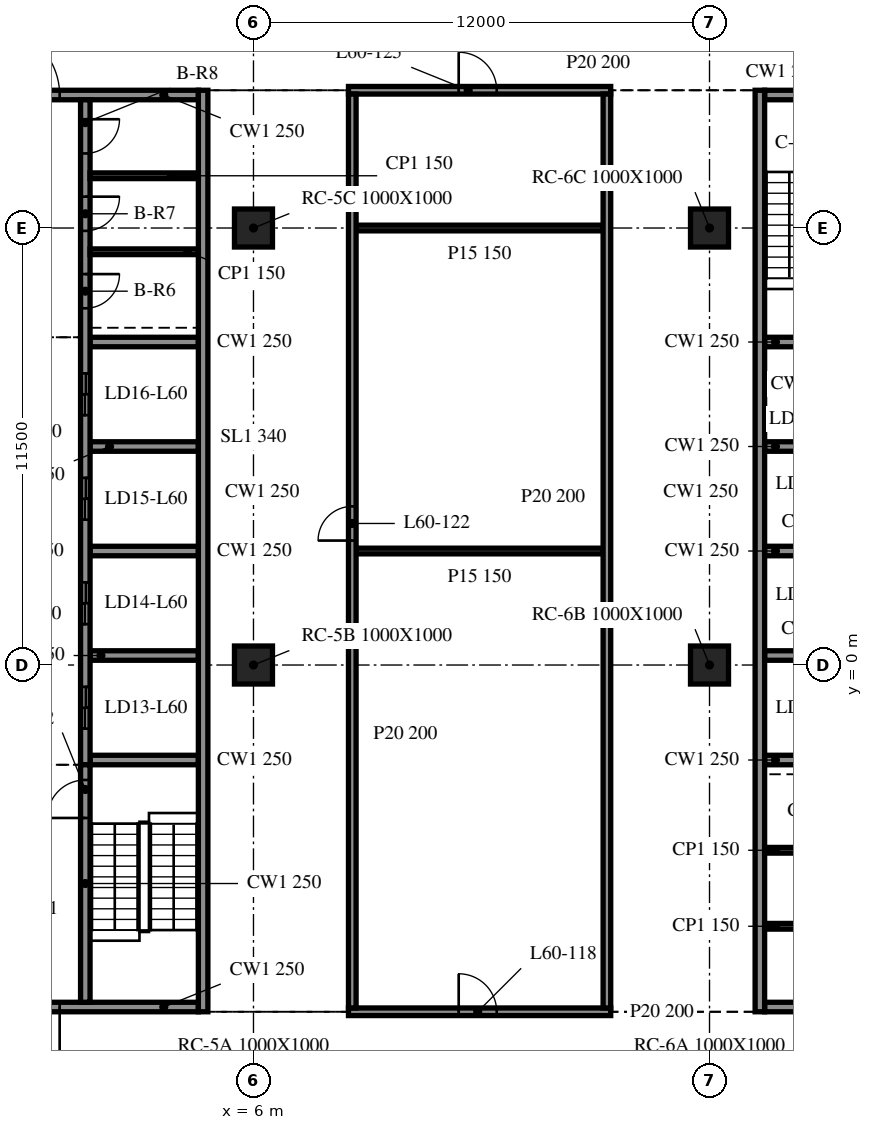
"""IFC4 building model, lengths in metres.
Left out: names, types, materials, properties, quantities, classifications, styles, units other than length and angle.
Written with IfcOpenShell. Run it as: python <this file> out.ifc"""

import sys

from ifc_helpers import new_model, si_unit, direction, frame, frame_2d, origin, origin_2d, place, context, subcontext, project, spatial, rectangle, extrude, element, fill, save


model = new_model("IFC4")
c1 = context("Model", 3, precision=1e-05, world=origin(), true_north=direction((0.0, 1.0)))
c2 = subcontext(c1, "Body", "Model", "MODEL_VIEW")
j1 = project(units=[si_unit("LENGTHUNIT", "METRE"), si_unit("PLANEANGLEUNIT", "RADIAN")], contexts=[c1])
p1 = place(None, origin())
s1 = spatial("IfcSite", under=j1, at=p1, CompositionType="ELEMENT")
p2 = place(p1, origin())
s2 = spatial("IfcBuilding", under=s1, at=p2, CompositionType="ELEMENT")
p3 = place(p2, frame((0.0, 0.0, 247.6)))
s3 = spatial("IfcBuildingStorey", under=s2, at=p3, CompositionType="ELEMENT", Elevation=247.6)
for number, where, z_axis, x_axis in (
    (1, (6.0, 0.0, -0.34), (0.0, 0.0, 1.0), (1.0, 0.0, 0.0)),
    (2, (6.0, 11.5, -0.34), (0.0, 0.0, 1.0), (1.0, 0.0, 0.0)),
    (3, (18.0, 0.0, -0.34), (0.0, 0.0, 1.0), (1.0, 0.0, 0.0)),
    (4, (18.0, 11.5, -0.34), (0.0, 0.0, 1.0), (1.0, 0.0, 0.0)),
):
    element("IfcColumn", number, at=place(p3, frame(where, z_axis=z_axis, x_axis=x_axis)), inside=s3, PredefinedType="COLUMN", context=c2, shape_type="SweptSolid", body=[
        extrude(rectangle(XDim=1.0, YDim=1.0, at=origin_2d()), origin(), (0.0, 0.0, 1.0), 3.8),
    ])
p4 = place(p3, frame((4.675, -9.125, 0.0), z_axis=(0.0, 0.0, 1.0), x_axis=(0.0, 1.0, 0.0)))
e5 = element("IfcWall", 5, at=p4, inside=s3, PredefinedType="SOLIDWALL", context=c2, shape_type="SweptSolid", body=[
    extrude(rectangle(XDim=24.25, YDim=0.25, at=frame_2d((12.125, 0.0))), origin(), (0.0, 0.0, 1.0), 3.46),
])
p5 = place(p3, frame((4.55, -9.0, 0.0), z_axis=(0.0, 0.0, 1.0), x_axis=(-1.0, 0.0, 0.0)))
e6 = element("IfcWall", 6, at=p5, inside=s3, PredefinedType="SOLIDWALL", context=c2, shape_type="SweptSolid", body=[
    extrude(rectangle(XDim=9.1, YDim=0.25, at=frame_2d((4.55, 0.0))), origin(), (0.0, 0.0, 1.0), 3.46),
])
p6 = place(p5, frame((3.65, 0.0, 0.0)))
e7 = element("IfcOpeningElement", 7, at=p6, cuts=e6, PredefinedType="OPENING", context=c2, shape_type="SweptSolid", body=[
    extrude(rectangle(XDim=1.8, YDim=2.1, at=frame_2d((0.9, 1.05))), frame((0.0, 0.135, 0.0), z_axis=(0.0, -1.0, 0.0), x_axis=(1.0, 0.0, 0.0)), (0.0, 0.0, 1.0), 0.27),
])
p7 = place(p3, frame((-4.55, 15.0, 0.0), z_axis=(0.0, 0.0, 1.0), x_axis=(1.0, 0.0, 0.0)))
e8 = element("IfcWall", 8, at=p7, inside=s3, PredefinedType="SOLIDWALL", context=c2, shape_type="SweptSolid", body=[
    extrude(rectangle(XDim=9.1, YDim=0.25, at=frame_2d((4.55, 0.0))), origin(), (0.0, 0.0, 1.0), 3.46),
])
p8 = place(p7, frame((3.65, 0.0, 0.0)))
e9 = element("IfcOpeningElement", 9, at=p8, cuts=e8, PredefinedType="OPENING", context=c2, shape_type="SweptSolid", body=[
    extrude(rectangle(XDim=1.8, YDim=2.1, at=frame_2d((0.9, 1.05))), frame((0.0, 0.135, 0.0), z_axis=(0.0, -1.0, 0.0), x_axis=(1.0, 0.0, 0.0)), (0.0, 0.0, 1.0), 0.27),
])
p9 = place(p3, frame((1.575, -8.875, 0.0), z_axis=(0.0, 0.0, 1.0), x_axis=(0.0, 1.0, 0.0)))
e10 = element("IfcWall", 10, at=p9, inside=s3, PredefinedType="SOLIDWALL", context=c2, shape_type="SweptSolid", body=[
    extrude(rectangle(XDim=6.25, YDim=0.25, at=frame_2d((3.125, 0.0))), origin(), (0.0, 0.0, 1.0), 3.46),
])
p10 = place(p9, frame((4.85, 0.0, 0.0)))
e11 = element("IfcOpeningElement", 11, at=p10, cuts=e10, PredefinedType="OPENING", context=c2, shape_type="SweptSolid", body=[
    extrude(rectangle(XDim=1.0, YDim=2.1, at=frame_2d((0.5, 1.05))), frame((0.0, 0.135, 0.0), z_axis=(0.0, -1.0, 0.0), x_axis=(1.0, 0.0, 0.0)), (0.0, 0.0, 1.0), 0.27),
])
p11 = place(p3, frame((1.575, 14.875, 0.0), z_axis=(0.0, 0.0, 1.0), x_axis=(0.0, -1.0, 0.0)))
e12 = element("IfcWall", 12, at=p11, inside=s3, PredefinedType="SOLIDWALL", context=c2, shape_type="SweptSolid", body=[
    extrude(rectangle(XDim=17.5, YDim=0.25, at=frame_2d((8.75, 0.0))), origin(), (0.0, 0.0, 1.0), 3.46),
])
p12 = place(p11, frame((15.45, 0.0, 0.0)))
e13 = element("IfcOpeningElement", 13, at=p12, cuts=e12, PredefinedType="OPENING", context=c2, shape_type="SweptSolid", body=[
    extrude(rectangle(XDim=1.1, YDim=2.1, at=frame_2d((0.55, 1.05))), frame((0.0, 0.135, 0.0), z_axis=(0.0, -1.0, 0.0), x_axis=(1.0, 0.0, 0.0)), (0.0, 0.0, 1.0), 0.27),
])
p13 = place(p11, frame((12.7, 0.0, 0.0)))
e14 = element("IfcOpeningElement", 14, at=p13, cuts=e12, PredefinedType="OPENING", context=c2, shape_type="SweptSolid", body=[
    extrude(rectangle(XDim=1.1, YDim=2.1, at=frame_2d((0.55, 1.05))), frame((0.0, 0.135, 0.0), z_axis=(0.0, -1.0, 0.0), x_axis=(1.0, 0.0, 0.0)), (0.0, 0.0, 1.0), 0.27),
])
p14 = place(p11, frame((9.95, 0.0, 0.0)))
e15 = element("IfcOpeningElement", 15, at=p14, cuts=e12, PredefinedType="OPENING", context=c2, shape_type="SweptSolid", body=[
    extrude(rectangle(XDim=1.1, YDim=2.1, at=frame_2d((0.55, 1.05))), frame((0.0, 0.135, 0.0), z_axis=(0.0, -1.0, 0.0), x_axis=(1.0, 0.0, 0.0)), (0.0, 0.0, 1.0), 0.27),
])
p15 = place(p11, frame((7.2, 0.0, 0.0)))
e16 = element("IfcOpeningElement", 16, at=p15, cuts=e12, PredefinedType="OPENING", context=c2, shape_type="SweptSolid", body=[
    extrude(rectangle(XDim=1.1, YDim=2.1, at=frame_2d((0.55, 1.05))), frame((0.0, 0.135, 0.0), z_axis=(0.0, -1.0, 0.0), x_axis=(1.0, 0.0, 0.0)), (0.0, 0.0, 1.0), 0.27),
])
p16 = place(p11, frame((4.587, 0.0, 0.0)))
e17 = element("IfcOpeningElement", 17, at=p16, cuts=e12, PredefinedType="OPENING", context=c2, shape_type="SweptSolid", body=[
    extrude(rectangle(XDim=0.9, YDim=2.1, at=frame_2d((0.45, 1.05))), frame((0.0, 0.135, 0.0), z_axis=(0.0, -1.0, 0.0), x_axis=(1.0, 0.0, 0.0)), (0.0, 0.0, 1.0), 0.27),
])
p17 = place(p11, frame((2.55, 0.0, 0.0)))
e18 = element("IfcOpeningElement", 18, at=p17, cuts=e12, PredefinedType="OPENING", context=c2, shape_type="SweptSolid", body=[
    extrude(rectangle(XDim=0.9, YDim=2.1, at=frame_2d((0.45, 1.05))), frame((0.0, 0.135, 0.0), z_axis=(0.0, -1.0, 0.0), x_axis=(1.0, 0.0, 0.0)), (0.0, 0.0, 1.0), 0.27),
])
p18 = place(p11, frame((0.512, 0.0, 0.0)))
e19 = element("IfcOpeningElement", 19, at=p18, cuts=e12, PredefinedType="OPENING", context=c2, shape_type="SweptSolid", body=[
    extrude(rectangle(XDim=0.9, YDim=2.1, at=frame_2d((0.45, 1.05))), frame((0.0, 0.135, 0.0), z_axis=(0.0, -1.0, 0.0), x_axis=(1.0, 0.0, 0.0)), (0.0, 0.0, 1.0), 0.27),
])
for number, where, z_axis, x_axis in (
    (20, (1.7, -2.5, 0.0), (0.0, 0.0, 1.0), (1.0, 0.0, 0.0)),
    (21, (1.7, 0.25, 0.0), (0.0, 0.0, 1.0), (1.0, 0.0, 0.0)),
    (22, (1.7, 3.0, 0.0), (0.0, 0.0, 1.0), (1.0, 0.0, 0.0)),
    (23, (1.7, 5.75, 0.0), (0.0, 0.0, 1.0), (1.0, 0.0, 0.0)),
    (24, (1.7, 8.5, 0.0), (0.0, 0.0, 1.0), (1.0, 0.0, 0.0)),
):
    element("IfcWall", number, at=place(p3, frame(where, z_axis=z_axis, x_axis=x_axis)), inside=s3, PredefinedType="SOLIDWALL", context=c2, shape_type="SweptSolid", body=[
        extrude(rectangle(XDim=2.85, YDim=0.25, at=frame_2d((1.425, 0.0))), origin(), (0.0, 0.0, 1.0), 3.46),
    ])
for number, where, z_axis, x_axis in (
    (25, (1.7, 10.875, 0.0), (0.0, 0.0, 1.0), (1.0, 0.0, 0.0)),
    (26, (1.7, 12.875, 0.0), (0.0, 0.0, 1.0), (1.0, 0.0, 0.0)),
):
    element("IfcWall", number, at=place(p3, frame(where, z_axis=z_axis, x_axis=x_axis)), inside=s3, PredefinedType="PARTITIONING", context=c2, shape_type="SweptSolid", body=[
        extrude(rectangle(XDim=2.85, YDim=0.15, at=frame_2d((1.425, 0.0))), origin(), (0.0, 0.0, 1.0), 3.46),
    ])
p19 = place(p3, frame((19.325, 15.125, 0.0), z_axis=(0.0, 0.0, 1.0), x_axis=(0.0, -1.0, 0.0)))
e27 = element("IfcWall", 27, at=p19, inside=s3, PredefinedType="SOLIDWALL", context=c2, shape_type="SweptSolid", body=[
    extrude(rectangle(XDim=24.25, YDim=0.25, at=frame_2d((12.125, 0.0))), origin(), (0.0, 0.0, 1.0), 3.46),
])
p20 = place(p3, frame((28.55, -9.0, 0.0), z_axis=(0.0, 0.0, 1.0), x_axis=(-1.0, 0.0, 0.0)))
e28 = element("IfcWall", 28, at=p20, inside=s3, PredefinedType="SOLIDWALL", context=c2, shape_type="SweptSolid", body=[
    extrude(rectangle(XDim=9.1, YDim=0.25, at=frame_2d((4.55, 0.0))), origin(), (0.0, 0.0, 1.0), 3.46),
])
p21 = place(p20, frame((3.65, 0.0, 0.0)))
e29 = element("IfcOpeningElement", 29, at=p21, cuts=e28, PredefinedType="OPENING", context=c2, shape_type="SweptSolid", body=[
    extrude(rectangle(XDim=1.8, YDim=2.1, at=frame_2d((0.9, 1.05))), frame((0.0, 0.135, 0.0), z_axis=(0.0, -1.0, 0.0), x_axis=(1.0, 0.0, 0.0)), (0.0, 0.0, 1.0), 0.27),
])
p22 = place(p3, frame((19.45, 15.0, 0.0), z_axis=(0.0, 0.0, 1.0), x_axis=(1.0, 0.0, 0.0)))
e30 = element("IfcWall", 30, at=p22, inside=s3, PredefinedType="SOLIDWALL", context=c2, shape_type="SweptSolid", body=[
    extrude(rectangle(XDim=9.1, YDim=0.25, at=frame_2d((4.55, 0.0))), origin(), (0.0, 0.0, 1.0), 3.46),
])
p23 = place(p22, frame((3.65, 0.0, 0.0)))
e31 = element("IfcOpeningElement", 31, at=p23, cuts=e30, PredefinedType="OPENING", context=c2, shape_type="SweptSolid", body=[
    extrude(rectangle(XDim=1.8, YDim=2.1, at=frame_2d((0.9, 1.05))), frame((0.0, 0.135, 0.0), z_axis=(0.0, -1.0, 0.0), x_axis=(1.0, 0.0, 0.0)), (0.0, 0.0, 1.0), 0.27),
])
for number, where, z_axis, x_axis in (
    (32, (19.45, -2.5, 0.0), (0.0, 0.0, 1.0), (1.0, 0.0, 0.0)),
    (33, (19.45, 0.25, 0.0), (0.0, 0.0, 1.0), (1.0, 0.0, 0.0)),
    (34, (19.45, 3.0, 0.0), (0.0, 0.0, 1.0), (1.0, 0.0, 0.0)),
    (35, (19.45, 5.75, 0.0), (0.0, 0.0, 1.0), (1.0, 0.0, 0.0)),
    (36, (19.45, 8.5, 0.0), (0.0, 0.0, 1.0), (1.0, 0.0, 0.0)),
):
    element("IfcWall", number, at=place(p3, frame(where, z_axis=z_axis, x_axis=x_axis)), inside=s3, PredefinedType="SOLIDWALL", context=c2, shape_type="SweptSolid", body=[
        extrude(rectangle(XDim=2.85, YDim=0.25, at=frame_2d((1.425, 0.0))), origin(), (0.0, 0.0, 1.0), 3.46),
    ])
for number, where, z_axis, x_axis in (
    (37, (19.45, -6.875, 0.0), (0.0, 0.0, 1.0), (1.0, 0.0, 0.0)),
    (38, (19.45, -4.875, 0.0), (0.0, 0.0, 1.0), (1.0, 0.0, 0.0)),
):
    element("IfcWall", number, at=place(p3, frame(where, z_axis=z_axis, x_axis=x_axis)), inside=s3, PredefinedType="PARTITIONING", context=c2, shape_type="SweptSolid", body=[
        extrude(rectangle(XDim=2.85, YDim=0.15, at=frame_2d((1.425, 0.0))), origin(), (0.0, 0.0, 1.0), 3.46),
    ])
p24 = place(p3, frame((8.5, -9.125, 0.0), z_axis=(0.0, 0.0, 1.0), x_axis=(1.0, 0.0, 0.0)))
e39 = element("IfcWall", 39, at=p24, inside=s3, PredefinedType="PARTITIONING", context=c2, shape_type="SweptSolid", body=[
    extrude(rectangle(XDim=6.9, YDim=0.2, at=frame_2d((3.45, 0.0))), origin(), (0.0, 0.0, 1.0), 3.46),
])
p25 = place(p24, frame((2.9, 0.0, 0.0)))
e40 = element("IfcOpeningElement", 40, at=p25, cuts=e39, PredefinedType="OPENING", context=c2, shape_type="SweptSolid", body=[
    extrude(rectangle(XDim=1.0, YDim=2.1, at=frame_2d((0.5, 1.05))), frame((0.0, 0.11, 0.0), z_axis=(0.0, -1.0, 0.0), x_axis=(1.0, 0.0, 0.0)), (0.0, 0.0, 1.0), 0.22),
])
for number, where, z_axis, x_axis in (
    (41, (8.7, 3.0, 0.0), (0.0, 0.0, 1.0), (1.0, 0.0, 0.0)),
    (42, (8.7, 11.5, 0.0), (0.0, 0.0, 1.0), (1.0, 0.0, 0.0)),
):
    element("IfcWall", number, at=place(p3, frame(where, z_axis=z_axis, x_axis=x_axis)), inside=s3, PredefinedType="PARTITIONING", context=c2, shape_type="SweptSolid", body=[
        extrude(rectangle(XDim=6.5, YDim=0.15, at=frame_2d((3.25, 0.0))), origin(), (0.0, 0.0, 1.0), 3.46),
    ])
p26 = place(p3, frame((8.5, 15.125, 0.0), z_axis=(0.0, 0.0, 1.0), x_axis=(1.0, 0.0, 0.0)))
e43 = element("IfcWall", 43, at=p26, inside=s3, PredefinedType="PARTITIONING", context=c2, shape_type="SweptSolid", body=[
    extrude(rectangle(XDim=6.9, YDim=0.2, at=frame_2d((3.45, 0.0))), origin(), (0.0, 0.0, 1.0), 3.46),
])
p27 = place(p26, frame((2.9, 0.0, 0.0)))
e44 = element("IfcOpeningElement", 44, at=p27, cuts=e43, PredefinedType="OPENING", context=c2, shape_type="SweptSolid", body=[
    extrude(rectangle(XDim=1.0, YDim=2.1, at=frame_2d((0.5, 1.05))), frame((0.0, 0.11, 0.0), z_axis=(0.0, -1.0, 0.0), x_axis=(1.0, 0.0, 0.0)), (0.0, 0.0, 1.0), 0.22),
])
p28 = place(p3, frame((8.6, -9.025, 0.0), z_axis=(0.0, 0.0, 1.0), x_axis=(0.0, 1.0, 0.0)))
e45 = element("IfcWall", 45, at=p28, inside=s3, PredefinedType="PARTITIONING", context=c2, shape_type="SweptSolid", body=[
    extrude(rectangle(XDim=24.05, YDim=0.2, at=frame_2d((12.025, 0.0))), origin(), (0.0, 0.0, 1.0), 3.46),
])
p29 = place(p28, frame((12.3, 0.0, 0.0)))
e46 = element("IfcOpeningElement", 46, at=p29, cuts=e45, PredefinedType="OPENING", context=c2, shape_type="SweptSolid", body=[
    extrude(rectangle(XDim=0.9, YDim=2.1, at=frame_2d((0.45, 1.05))), frame((0.0, 0.11, 0.0), z_axis=(0.0, -1.0, 0.0), x_axis=(1.0, 0.0, 0.0)), (0.0, 0.0, 1.0), 0.22),
])
p30 = place(p3, frame((15.3, -9.025, 0.0), z_axis=(0.0, 0.0, 1.0), x_axis=(0.0, 1.0, 0.0)))
e47 = element("IfcWall", 47, at=p30, inside=s3, PredefinedType="PARTITIONING", context=c2, shape_type="SweptSolid", body=[
    extrude(rectangle(XDim=24.05, YDim=0.2, at=frame_2d((12.025, 0.0))), origin(), (0.0, 0.0, 1.0), 3.46),
])
p31 = place(p6, origin())
e48 = element("IfcDoor", 48, at=p31, inside=s3, OperationType="DOUBLE_DOOR_SINGLE_SWING", PredefinedType="DOOR", context=c2, shape_type="SweptSolid", body=[
    extrude(rectangle(XDim=1.8, YDim=2.1, at=frame_2d((0.9, 1.05))), frame((0.0, 0.025, 0.0), z_axis=(0.0, -1.0, 0.0), x_axis=(1.0, 0.0, 0.0)), (0.0, 0.0, 1.0), 0.05),
])
fill(e7, e48)
p32 = place(p8, origin())
e49 = element("IfcDoor", 49, at=p32, inside=s3, OperationType="DOUBLE_DOOR_SINGLE_SWING", PredefinedType="DOOR", context=c2, shape_type="SweptSolid", body=[
    extrude(rectangle(XDim=1.8, YDim=2.1, at=frame_2d((0.9, 1.05))), frame((0.0, 0.025, 0.0), z_axis=(0.0, -1.0, 0.0), x_axis=(1.0, 0.0, 0.0)), (0.0, 0.0, 1.0), 0.05),
])
fill(e9, e49)
p33 = place(p12, origin())
e50 = element("IfcDoor", 50, at=p33, inside=s3, OperationType="DOUBLE_DOOR_SLIDING", PredefinedType="DOOR", context=c2, shape_type="SweptSolid", body=[
    extrude(rectangle(XDim=1.1, YDim=2.1, at=frame_2d((0.55, 1.05))), frame((0.0, 0.025, 0.0), z_axis=(0.0, -1.0, 0.0), x_axis=(1.0, 0.0, 0.0)), (0.0, 0.0, 1.0), 0.05),
])
fill(e13, e50)
p34 = place(p13, origin())
e51 = element("IfcDoor", 51, at=p34, inside=s3, OperationType="DOUBLE_DOOR_SLIDING", PredefinedType="DOOR", context=c2, shape_type="SweptSolid", body=[
    extrude(rectangle(XDim=1.1, YDim=2.1, at=frame_2d((0.55, 1.05))), frame((0.0, 0.025, 0.0), z_axis=(0.0, -1.0, 0.0), x_axis=(1.0, 0.0, 0.0)), (0.0, 0.0, 1.0), 0.05),
])
fill(e14, e51)
p35 = place(p14, origin())
e52 = element("IfcDoor", 52, at=p35, inside=s3, OperationType="DOUBLE_DOOR_SLIDING", PredefinedType="DOOR", context=c2, shape_type="SweptSolid", body=[
    extrude(rectangle(XDim=1.1, YDim=2.1, at=frame_2d((0.55, 1.05))), frame((0.0, 0.025, 0.0), z_axis=(0.0, -1.0, 0.0), x_axis=(1.0, 0.0, 0.0)), (0.0, 0.0, 1.0), 0.05),
])
fill(e15, e52)
p36 = place(p15, origin())
e53 = element("IfcDoor", 53, at=p36, inside=s3, OperationType="DOUBLE_DOOR_SLIDING", PredefinedType="DOOR", context=c2, shape_type="SweptSolid", body=[
    extrude(rectangle(XDim=1.1, YDim=2.1, at=frame_2d((0.55, 1.05))), frame((0.0, 0.025, 0.0), z_axis=(0.0, -1.0, 0.0), x_axis=(1.0, 0.0, 0.0)), (0.0, 0.0, 1.0), 0.05),
])
fill(e16, e53)
p37 = place(p16, origin())
e54 = element("IfcDoor", 54, at=p37, inside=s3, OperationType="SINGLE_SWING_RIGHT", PredefinedType="DOOR", context=c2, shape_type="SweptSolid", body=[
    extrude(rectangle(XDim=0.9, YDim=2.1, at=frame_2d((0.45, 1.05))), frame((0.0, 0.025, 0.0), z_axis=(0.0, -1.0, 0.0), x_axis=(1.0, 0.0, 0.0)), (0.0, 0.0, 1.0), 0.05),
])
fill(e17, e54)
p38 = place(p17, origin())
e55 = element("IfcDoor", 55, at=p38, inside=s3, OperationType="SINGLE_SWING_LEFT", PredefinedType="DOOR", context=c2, shape_type="SweptSolid", body=[
    extrude(rectangle(XDim=0.9, YDim=2.1, at=frame_2d((0.45, 1.05))), frame((0.0, 0.025, 0.0), z_axis=(0.0, -1.0, 0.0), x_axis=(1.0, 0.0, 0.0)), (0.0, 0.0, 1.0), 0.05),
])
fill(e18, e55)
p39 = place(p18, origin())
e56 = element("IfcDoor", 56, at=p39, inside=s3, OperationType="SINGLE_SWING_RIGHT", PredefinedType="DOOR", context=c2, shape_type="SweptSolid", body=[
    extrude(rectangle(XDim=0.9, YDim=2.1, at=frame_2d((0.45, 1.05))), frame((0.0, 0.025, 0.0), z_axis=(0.0, -1.0, 0.0), x_axis=(1.0, 0.0, 0.0)), (0.0, 0.0, 1.0), 0.05),
])
fill(e19, e56)
p40 = place(p10, origin())
e57 = element("IfcDoor", 57, at=p40, inside=s3, OperationType="SINGLE_SWING_LEFT", PredefinedType="DOOR", context=c2, shape_type="SweptSolid", body=[
    extrude(rectangle(XDim=1.0, YDim=2.1, at=frame_2d((0.5, 1.05))), frame((0.0, 0.025, 0.0), z_axis=(0.0, -1.0, 0.0), x_axis=(1.0, 0.0, 0.0)), (0.0, 0.0, 1.0), 0.05),
])
fill(e11, e57)
p41 = place(p25, origin())
e58 = element("IfcDoor", 58, at=p41, inside=s3, OperationType="SINGLE_SWING_LEFT", PredefinedType="DOOR", context=c2, shape_type="SweptSolid", body=[
    extrude(rectangle(XDim=1.0, YDim=2.1, at=frame_2d((0.5, 1.05))), frame((0.0, 0.025, 0.0), z_axis=(0.0, -1.0, 0.0), x_axis=(1.0, 0.0, 0.0)), (0.0, 0.0, 1.0), 0.05),
])
fill(e40, e58)
p42 = place(p29, origin())
e59 = element("IfcDoor", 59, at=p42, inside=s3, OperationType="SINGLE_SWING_LEFT", PredefinedType="DOOR", context=c2, shape_type="SweptSolid", body=[
    extrude(rectangle(XDim=0.9, YDim=2.1, at=frame_2d((0.45, 1.05))), frame((0.0, 0.025, 0.0), z_axis=(0.0, -1.0, 0.0), x_axis=(1.0, 0.0, 0.0)), (0.0, 0.0, 1.0), 0.05),
])
fill(e46, e59)
p43 = place(p27, origin())
e60 = element("IfcDoor", 60, at=p43, inside=s3, OperationType="SINGLE_SWING_RIGHT", PredefinedType="DOOR", context=c2, shape_type="SweptSolid", body=[
    extrude(rectangle(XDim=1.0, YDim=2.1, at=frame_2d((0.5, 1.05))), frame((0.0, 0.025, 0.0), z_axis=(0.0, -1.0, 0.0), x_axis=(1.0, 0.0, 0.0)), (0.0, 0.0, 1.0), 0.05),
])
fill(e44, e60)
save(model, sys.argv[1])
